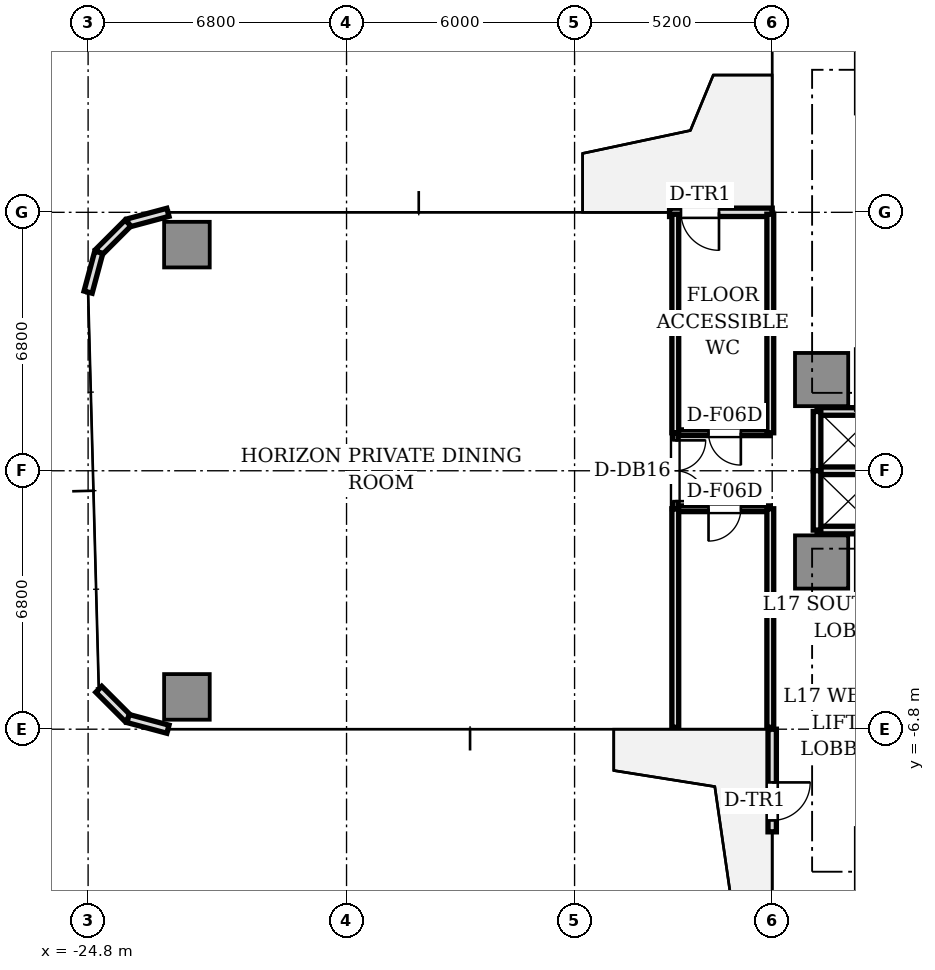
"""IFC4 building model, lengths in metres.
Left out: names, types, materials, properties, quantities, classifications, styles, units other than length and angle.
Written with IfcOpenShell. Run it as: python <this file> out.ifc"""

import sys

from ifc_helpers import new_model, si_unit, direction, frame, frame_2d, origin, origin_2d, place, context, subcontext, project, spatial, rectangle, extrude, source, transform, mapped, element, fill, save


model = new_model("IFC4")
c1 = context("Model", 3, precision=1e-05, world=origin(), true_north=direction((0.0, 1.0)))
c2 = subcontext(c1, "Body", "Model", "MODEL_VIEW")
j1 = project(units=[si_unit("LENGTHUNIT", "METRE"), si_unit("PLANEANGLEUNIT", "RADIAN")], contexts=[c1])
p1 = place(None, origin())
s1 = spatial("IfcSite", under=j1, at=p1, CompositionType="ELEMENT")
p2 = place(p1, origin())
s2 = spatial("IfcBuilding", under=s1, at=p2, CompositionType="ELEMENT")
p3 = place(p2, frame((0.0, 0.0, 64.45)))
s3 = spatial("IfcBuildingStorey", under=s2, at=p3, CompositionType="ELEMENT", Elevation=64.45)
m1 = source(origin(), c2, "Body", "SweptSolid", [
    extrude(rectangle(XDim=1.4, YDim=1.4, at=origin_2d()), origin(), (0.0, 0.0, 1.0), 3.11),
])
for number, where, z_axis, x_axis in (
    (1, (-5.5, 2.4, 0.0), (0.0, 0.0, 1.0), (1.0, 0.0, 0.0)),
    (2, (-5.5, -2.4, 0.0), (0.0, 0.0, 1.0), (1.0, 0.0, 0.0)),
):
    element("IfcColumn", number, at=place(p3, frame(where, z_axis=z_axis, x_axis=x_axis)), inside=s3, PredefinedType="COLUMN", context=c2, shape_type="MappedRepresentation", body=[
        mapped(m1, transform((0.0, 0.0, 0.0), scale=1.0)),
    ])
m2 = source(origin(), c2, "Body", "SweptSolid", [
    extrude(rectangle(XDim=1.2, YDim=1.2, at=origin_2d()), origin(), (0.0, 0.0, 1.0), 3.11),
])
for number, where, z_axis, x_axis in (
    (3, (-22.2, 5.95, 0.0), (0.0, 0.0, 1.0), (1.0, 0.0, 0.0)),
    (4, (-22.2, -5.95, 0.0), (0.0, 0.0, 1.0), (1.0, 0.0, 0.0)),
):
    element("IfcColumn", number, at=place(p3, frame(where, z_axis=z_axis, x_axis=x_axis)), inside=s3, PredefinedType="COLUMN", context=c2, shape_type="MappedRepresentation", body=[
        mapped(m2, transform((0.0, 0.0, 0.0), scale=1.0)),
    ])
p4 = place(p3, frame((-6.8, 6.8, 0.0), z_axis=(0.0, 0.0, 1.0), x_axis=(-1.0, 0.0, 0.0)))
e5 = element("IfcWall", 5, at=p4, inside=s3, PredefinedType="STANDARD", context=c2, shape_type="SweptSolid", body=[
    extrude(rectangle(XDim=2.7, YDim=0.22, at=frame_2d((1.35, 0.0))), origin(), (0.0, 0.0, 1.0), 3.11),
])
p5 = place(p4, frame((1.4, 0.0, 0.0)))
e6 = element("IfcOpeningElement", 6, at=p5, cuts=e5, PredefinedType="OPENING", context=c2, shape_type="SweptSolid", body=[
    extrude(rectangle(XDim=1.0, YDim=2.2, at=frame_2d((0.5, 1.1))), frame((0.0, 0.12, 0.0), z_axis=(0.0, -1.0, 0.0), x_axis=(1.0, 0.0, 0.0)), (0.0, 0.0, 1.0), 0.24),
])
for number, where, z_axis, x_axis in (
    (7, (-22.7, 6.8, 0.0), (0.0, 0.0, 1.0), (-0.966, -0.259, 0.0)),
    (8, (-23.75, 6.519, 0.0), (0.0, 0.0, 1.0), (-0.707, -0.707, 0.0)),
    (9, (-24.519, 5.75, 0.0), (0.0, 0.0, 1.0), (-0.259, -0.966, 0.0)),
    (10, (-24.519, -5.75, 0.0), (0.0, 0.0, 1.0), (0.707, -0.707, 0.0)),
    (11, (-23.75, -6.519, 0.0), (0.0, 0.0, 1.0), (0.966, -0.259, 0.0)),
):
    element("IfcWall", number, at=place(p3, frame(where, z_axis=z_axis, x_axis=x_axis)), inside=s3, PredefinedType="STANDARD", context=c2, shape_type="SweptSolid", body=[
        extrude(rectangle(XDim=1.087, YDim=0.22, at=frame_2d((0.543, 0.0))), origin(), (0.0, 0.0, 1.0), 3.11),
    ])
p6 = place(p3, frame((-6.8, -6.8, 0.0), z_axis=(0.0, 0.0, 1.0), x_axis=(0.0, -1.0, 0.0)))
e12 = element("IfcWall", 12, at=p6, inside=s3, PredefinedType="STANDARD", context=c2, shape_type="SweptSolid", body=[
    extrude(rectangle(XDim=2.7, YDim=0.22, at=frame_2d((1.35, 0.0))), origin(), (0.0, 0.0, 1.0), 3.11),
])
p7 = place(p6, frame((1.4, 0.0, 0.0)))
e13 = element("IfcOpeningElement", 13, at=p7, cuts=e12, PredefinedType="OPENING", context=c2, shape_type="SweptSolid", body=[
    extrude(rectangle(XDim=1.0, YDim=2.2, at=frame_2d((0.5, 1.1))), frame((0.0, 0.12, 0.0), z_axis=(0.0, -1.0, 0.0), x_axis=(1.0, 0.0, 0.0)), (0.0, 0.0, 1.0), 0.24),
])
for number, where, z_axis, x_axis in (
    (14, (-5.62, 1.56, 0.0), (0.0, 0.0, 1.0), (1.0, 0.0, 0.0)),
    (15, (-5.62, -1.56, 0.0), (0.0, 0.0, 1.0), (1.0, 0.0, 0.0)),
    (16, (-5.62, 0.0, 0.0), (0.0, 0.0, 1.0), (1.0, 0.0, 0.0)),
):
    element("IfcWall", number, at=place(p3, frame(where, z_axis=z_axis, x_axis=x_axis)), inside=s3, PredefinedType="SOLIDWALL", context=c2, shape_type="SweptSolid", body=[
        extrude(rectangle(XDim=1.64, YDim=0.2, at=frame_2d((0.82, 0.0))), origin(), (0.0, 0.0, 1.0), 2.66),
    ])
for number, where, z_axis, x_axis in (
    (17, (-5.62, 0.0, 0.0), (0.0, 0.0, 1.0), (0.0, 1.0, 0.0)),
    (18, (-5.62, -1.56, 0.0), (0.0, 0.0, 1.0), (0.0, 1.0, 0.0)),
):
    element("IfcWall", number, at=place(p3, frame(where, z_axis=z_axis, x_axis=x_axis)), inside=s3, PredefinedType="SOLIDWALL", context=c2, shape_type="SweptSolid", body=[
        extrude(rectangle(XDim=1.56, YDim=0.2, at=frame_2d((0.78, 0.0))), origin(), (0.0, 0.0, 1.0), 2.66),
    ])
p8 = place(p3, frame((-6.85, -1.0, 0.0), z_axis=(0.0, 0.0, 1.0), x_axis=(-1.0, 0.0, 0.0)))
e19 = element("IfcWall", 19, at=p8, inside=s3, PredefinedType="PARTITIONING", context=c2, shape_type="SweptSolid", body=[
    extrude(rectangle(XDim=2.5, YDim=0.15, at=frame_2d((1.25, 0.0))), origin(), (0.0, 0.0, 1.0), 2.66),
])
p9 = place(p8, frame((0.775, 0.0, 0.0)))
e20 = element("IfcOpeningElement", 20, at=p9, cuts=e19, PredefinedType="OPENING", context=c2, shape_type="SweptSolid", body=[
    extrude(rectangle(XDim=0.85, YDim=2.1, at=frame_2d((0.425, 1.05))), frame((0.0, 0.085, 0.0), z_axis=(0.0, -1.0, 0.0), x_axis=(1.0, 0.0, 0.0)), (0.0, 0.0, 1.0), 0.17),
])
p10 = place(p3, frame((-6.85, 1.0, 0.0), z_axis=(0.0, 0.0, 1.0), x_axis=(-1.0, 0.0, 0.0)))
e21 = element("IfcWall", 21, at=p10, inside=s3, PredefinedType="PARTITIONING", context=c2, shape_type="SweptSolid", body=[
    extrude(rectangle(XDim=2.5, YDim=0.15, at=frame_2d((1.25, 0.0))), origin(), (0.0, 0.0, 1.0), 2.66),
])
p11 = place(p10, frame((0.775, 0.0, 0.0)))
e22 = element("IfcOpeningElement", 22, at=p11, cuts=e21, PredefinedType="OPENING", context=c2, shape_type="SweptSolid", body=[
    extrude(rectangle(XDim=0.85, YDim=2.1, at=frame_2d((0.425, 1.05))), frame((0.0, 0.085, 0.0), z_axis=(0.0, -1.0, 0.0), x_axis=(1.0, 0.0, 0.0)), (0.0, 0.0, 1.0), 0.17),
])
for number, where, z_axis, x_axis in (
    (23, (-6.85, -1.0, 0.0), (0.0, 0.0, 1.0), (0.0, -1.0, 0.0)),
    (24, (-6.85, 6.75, 0.0), (0.0, 0.0, 1.0), (0.0, -1.0, 0.0)),
    (25, (-9.35, 1.0, 0.0), (0.0, 0.0, 1.0), (0.0, 1.0, 0.0)),
    (26, (-9.35, -1.0, 0.0), (0.0, 0.0, 1.0), (0.0, -1.0, 0.0)),
):
    element("IfcWall", number, at=place(p3, frame(where, z_axis=z_axis, x_axis=x_axis)), inside=s3, PredefinedType="PARTITIONING", context=c2, shape_type="SweptSolid", body=[
        extrude(rectangle(XDim=5.75, YDim=0.18, at=frame_2d((2.875, 0.0))), origin(), (0.0, 0.0, 1.0), 2.66),
    ])
p12 = place(p3, frame((-9.35, 1.0, 0.0), z_axis=(0.0, 0.0, 1.0), x_axis=(0.0, -1.0, 0.0)))
e27 = element("IfcWall", 27, at=p12, inside=s3, PredefinedType="PARTITIONING", context=c2, shape_type="SweptSolid", body=[
    extrude(rectangle(XDim=2.0, YDim=0.15, at=frame_2d((1.0, 0.0))), origin(), (0.0, 0.0, 1.0), 2.66),
])
p13 = place(p12, frame((0.2, 0.0, 0.0)))
e28 = element("IfcOpeningElement", 28, at=p13, cuts=e27, PredefinedType="OPENING", context=c2, shape_type="SweptSolid", body=[
    extrude(rectangle(XDim=1.6, YDim=2.25, at=frame_2d((0.8, 1.125))), frame((0.0, 0.085, 0.0), z_axis=(0.0, -1.0, 0.0), x_axis=(1.0, 0.0, 0.0)), (0.0, 0.0, 1.0), 0.17),
])
m3 = source(origin(), c2, "Body", "SweptSolid", [
    extrude(rectangle(XDim=1.0, YDim=0.05, at=origin_2d()), origin(), (0.0, 0.0, 1.0), 2.2),
])
p14 = place(p5, frame((0.5, 0.0, 0.0)))
e29 = element("IfcDoor", 29, at=p14, inside=s3, OperationType="SINGLE_SWING_LEFT", PredefinedType="DOOR", context=c2, shape_type="MappedRepresentation", body=[
    mapped(m3, transform((0.0, 0.0, 0.0), scale=1.0)),
])
fill(e6, e29)
p15 = place(p7, frame((0.5, 0.0, 0.0)))
e30 = element("IfcDoor", 30, at=p15, inside=s3, OperationType="SINGLE_SWING_LEFT", PredefinedType="DOOR", context=c2, shape_type="MappedRepresentation", body=[
    mapped(m3, transform((0.0, 0.0, 0.0), scale=1.0)),
])
fill(e13, e30)
m4 = source(origin(), c2, "Body", "SweptSolid", [
    extrude(rectangle(XDim=0.85, YDim=0.05, at=origin_2d()), origin(), (0.0, 0.0, 1.0), 2.1),
])
p16 = place(p11, frame((0.425, 0.0, 0.0)))
e31 = element("IfcDoor", 31, at=p16, inside=s3, OperationType="SINGLE_SWING_LEFT", PredefinedType="DOOR", context=c2, shape_type="MappedRepresentation", body=[
    mapped(m4, transform((0.0, 0.0, 0.0), scale=1.0)),
])
fill(e22, e31)
p17 = place(p9, frame((0.425, 0.0, 0.0)))
e32 = element("IfcDoor", 32, at=p17, inside=s3, OperationType="SINGLE_SWING_RIGHT", PredefinedType="DOOR", context=c2, shape_type="MappedRepresentation", body=[
    mapped(m4, transform((0.0, 0.0, 0.0), scale=1.0)),
])
fill(e20, e32)
m5 = source(origin(), c2, "Body", "SweptSolid", [
    extrude(rectangle(XDim=1.6, YDim=0.05, at=origin_2d()), origin(), (0.0, 0.0, 1.0), 2.25),
])
p18 = place(p13, frame((0.8, 0.0, 0.0)))
e33 = element("IfcDoor", 33, at=p18, inside=s3, OperationType="DOUBLE_DOOR_SINGLE_SWING", PredefinedType="DOOR", context=c2, shape_type="MappedRepresentation", body=[
    mapped(m5, transform((0.0, 0.0, 0.0), scale=1.0)),
])
fill(e28, e33)
save(model, sys.argv[1])
